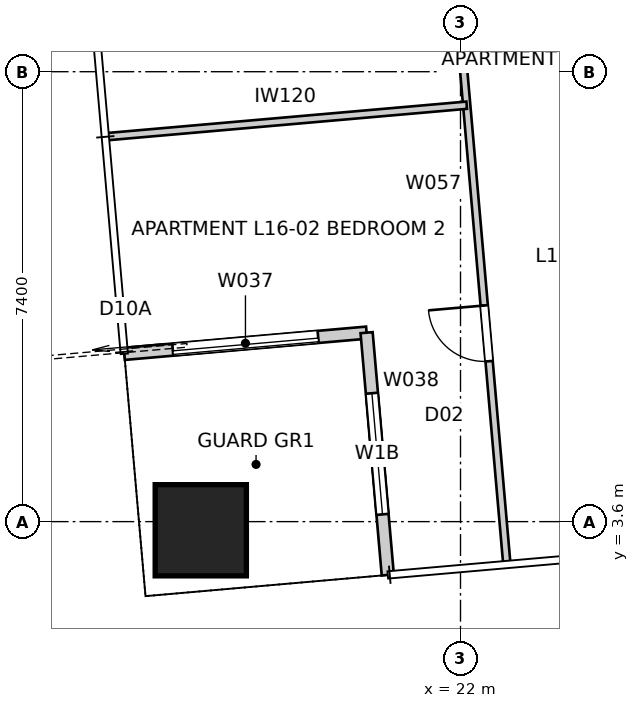
"""IFC4 building model, lengths in metres.
Left out: names, types, materials, properties, quantities, classifications, styles, units other than length and angle.
Written with IfcOpenShell. Run it as: python <this file> out.ifc"""

import sys

from ifc_helpers import new_model, si_unit, direction, frame, frame_2d, origin, origin_2d, place, context, subcontext, project, spatial, rectangle, extrude, element, fill, save


model = new_model("IFC4")
c1 = context("Model", 3, precision=1e-05, world=origin(), true_north=direction((0.0, 1.0)))
c2 = subcontext(c1, "Body", "Model", "MODEL_VIEW")
j1 = project(units=[si_unit("LENGTHUNIT", "METRE"), si_unit("PLANEANGLEUNIT", "RADIAN")], contexts=[c1])
p1 = place(None, origin())
s1 = spatial("IfcSite", under=j1, at=p1, CompositionType="ELEMENT")
p2 = place(p1, origin())
s2 = spatial("IfcBuilding", under=s1, at=p2, CompositionType="ELEMENT")
p3 = place(p2, frame((0.0, 0.0, 60.8)))
s3 = spatial("IfcBuildingStorey", under=s2, at=p3, CompositionType="ELEMENT", Elevation=60.8)
p4 = place(p3, frame((17.729, 3.458, 0.0), z_axis=(0.0, 0.0, 1.0), x_axis=(1.0, 0.0, 0.0)))
e1 = element("IfcColumn", 1, at=p4, inside=s3, PredefinedType="COLUMN", context=c2, shape_type="SweptSolid", body=[
    extrude(rectangle(XDim=1.5, YDim=1.5, at=origin_2d()), origin(), (0.0, 0.0, 1.0), 3.4),
])
p5 = place(p3, frame((16.471, 6.359, 0.0), z_axis=(0.0, 0.0, 1.0), x_axis=(0.99619418125, 0.087161650072, 0.0)))
e2 = element("IfcWall", 2, at=p5, inside=s3, PredefinedType="SOLIDWALL", context=c2, shape_type="SweptSolid", body=[
    extrude(rectangle(XDim=4.0, YDim=0.2, at=frame_2d((2.0, 0.0))), origin(), (0.0, 0.0, 1.0), 3.25),
])
p6 = place(p5, frame((0.8, 0.0, 0.0)))
e3 = element("IfcOpeningElement", 3, at=p6, cuts=e2, PredefinedType="OPENING", context=c2, shape_type="SweptSolid", body=[
    extrude(rectangle(XDim=2.4, YDim=2.1, at=frame_2d((1.2, 1.05))), frame((0.0, 0.11, 0.0), z_axis=(0.0, -1.0, 0.0), x_axis=(1.0, 0.0, 0.0)), (0.0, 0.0, 1.0), 0.22),
])
p7 = place(p3, frame((20.456, 6.708, 0.0), z_axis=(0.0, 0.0, 1.0), x_axis=(0.087156350505, -0.99619464492, 0.0)))
e4 = element("IfcWall", 4, at=p7, inside=s3, PredefinedType="SOLIDWALL", context=c2, shape_type="SweptSolid", body=[
    extrude(rectangle(XDim=4.0, YDim=0.2, at=frame_2d((2.0, 0.0))), origin(), (0.0, 0.0, 1.0), 3.25),
])
p8 = place(p7, frame((1.0, 0.0, 0.45)))
e5 = element("IfcOpeningElement", 5, at=p8, cuts=e4, PredefinedType="OPENING", context=c2, shape_type="SweptSolid", body=[
    extrude(rectangle(XDim=2.0, YDim=1.8, at=frame_2d((1.0, 0.9))), frame((0.0, 0.11, 0.0), z_axis=(0.0, -1.0, 0.0), x_axis=(1.0, 0.0, 0.0)), (0.0, 0.0, 1.0), 0.22),
])
p9 = place(p3, frame((22.759, 2.934, 0.0), z_axis=(0.0, 0.0, 1.0), x_axis=(-0.087130477128, 0.996196908224, 0.0)))
e6 = element("IfcWall", 6, at=p9, inside=s3, PredefinedType="PARTITIONING", context=c2, shape_type="SweptSolid", body=[
    extrude(rectangle(XDim=11.127, YDim=0.12, at=frame_2d((5.563, 0.0))), origin(), (0.0, 0.0, 1.0), 3.25),
])
p10 = place(p9, frame((3.317, 0.0, 0.0)))
e7 = element("IfcOpeningElement", 7, at=p10, cuts=e6, PredefinedType="OPENING", context=c2, shape_type="SweptSolid", body=[
    extrude(rectangle(XDim=0.92, YDim=2.34, at=frame_2d((0.46, 1.17))), frame((0.0, 0.07, 0.0), z_axis=(0.0, -1.0, 0.0), x_axis=(1.0, 0.0, 0.0)), (0.0, 0.0, 1.0), 0.14),
])
p11 = place(p3, frame((16.198, 9.933, 0.0), z_axis=(0.0, 0.0, 1.0), x_axis=(0.996196712973, 0.08713270948, 0.0)))
e8 = element("IfcWall", 8, at=p11, inside=s3, PredefinedType="PARTITIONING", context=c2, shape_type="SweptSolid", body=[
    extrude(rectangle(XDim=5.926, YDim=0.12, at=frame_2d((2.963, 0.0))), origin(), (0.0, 0.0, 1.0), 3.25),
])
p12 = place(p6, origin())
e9 = element("IfcDoor", 9, at=p12, inside=s3, OperationType="SLIDING_TO_LEFT", PredefinedType="DOOR", context=c2, shape_type="SweptSolid", body=[
    extrude(rectangle(XDim=2.4, YDim=2.1, at=frame_2d((1.2, 1.05))), frame((0.0, 0.025, 0.0), z_axis=(0.0, -1.0, 0.0), x_axis=(1.0, 0.0, 0.0)), (0.0, 0.0, 1.0), 0.05),
])
fill(e3, e9)
p13 = place(p8, origin())
e10 = element("IfcWindow", 10, at=p13, inside=s3, PartitioningType="SINGLE_PANEL", PredefinedType="WINDOW", context=c2, shape_type="SweptSolid", body=[
    extrude(rectangle(XDim=2.0, YDim=1.8, at=frame_2d((1.0, 0.9))), frame((0.0, 0.03, 0.0), z_axis=(0.0, -1.0, 0.0), x_axis=(1.0, 0.0, 0.0)), (0.0, 0.0, 1.0), 0.06),
])
fill(e5, e10)
p14 = place(p10, origin())
e11 = element("IfcDoor", 11, at=p14, inside=s3, OperationType="SINGLE_SWING_RIGHT", PredefinedType="DOOR", context=c2, shape_type="SweptSolid", body=[
    extrude(rectangle(XDim=0.92, YDim=2.34, at=frame_2d((0.46, 1.17))), frame((0.0, 0.025, 0.0), z_axis=(0.0, -1.0, 0.0), x_axis=(1.0, 0.0, 0.0)), (0.0, 0.0, 1.0), 0.05),
])
fill(e7, e11)
save(model, sys.argv[1])
